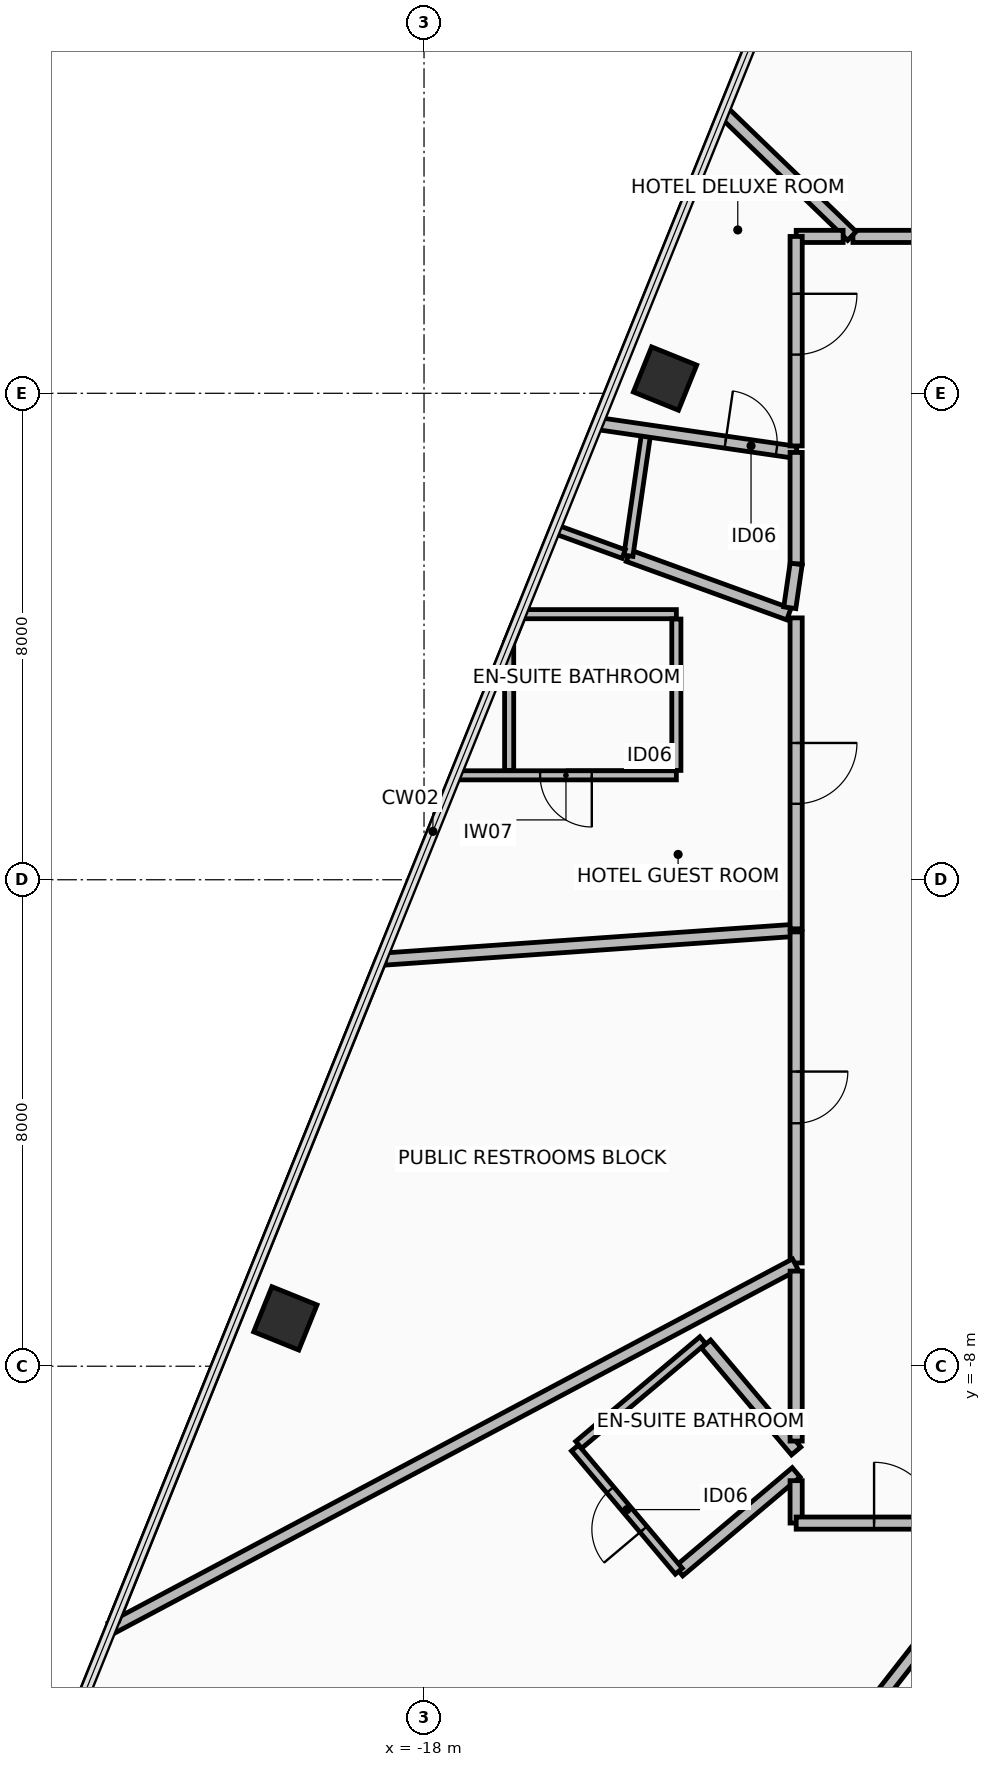
"""IFC4 building model, lengths in metres.
Left out: names, types, materials, properties, quantities, classifications, styles, units other than length and angle.
Written with IfcOpenShell. Run it as: python <this file> out.ifc"""

import sys

from ifc_helpers import new_model, si_unit, direction, frame, frame_2d, origin, origin_2d, place, context, subcontext, project, spatial, rectangle, hollow_rectangle, extrude, element, fill, save


model = new_model("IFC4")
c1 = context("Model", 3, precision=1e-05, world=origin(), true_north=direction((0.0, 1.0)))
c2 = subcontext(c1, "Body", "Model", "MODEL_VIEW")
j1 = project(units=[si_unit("LENGTHUNIT", "METRE"), si_unit("PLANEANGLEUNIT", "RADIAN")], contexts=[c1])
p1 = place(None, origin())
s1 = spatial("IfcSite", under=j1, at=p1, CompositionType="ELEMENT")
p2 = place(p1, origin())
s2 = spatial("IfcBuilding", under=s1, at=p2, CompositionType="ELEMENT")
p3 = place(p2, frame((0.0, 0.0, 67.3)))
s3 = spatial("IfcBuildingStorey", under=s2, at=p3, CompositionType="ELEMENT", Elevation=67.3)
for number, where, z_axis, x_axis in (
    (1, (-14.036, 8.242, 0.0), (0.0, 0.0, 1.0), (0.375, 0.927, 0.0)),
    (2, (-20.281, -7.213, 0.0), (0.0, 0.0, 1.0), (0.375, 0.927, 0.0)),
):
    element("IfcColumn", number, at=place(p3, frame(where, z_axis=z_axis, x_axis=x_axis)), inside=s3, PredefinedType="COLUMN", context=c2, shape_type="SweptSolid", body=[
        extrude(hollow_rectangle(XDim=0.8, YDim=0.8, WallThickness=0.045, at=origin_2d()), origin(), (0.0, 0.0, 1.0), 3.45),
    ])
p4 = place(p3, frame((-12.0, 4.368, 0.0), z_axis=(0.0, 0.0, 1.0), x_axis=(-0.939689330019, 0.342029184499, 0.0)))
e3 = element("IfcWall", 3, at=p4, inside=s3, PredefinedType="PARTITIONING", context=c2, shape_type="SweptSolid", body=[
    extrude(rectangle(XDim=2.809, YDim=0.2, at=frame_2d((1.404, 0.0))), origin(), (0.0, 0.0, 1.0), 2.87),
])
p5 = place(p3, frame((-14.639, 5.328, 0.0), z_axis=(0.0, 0.0, 1.0), x_axis=(0.143755820494, 0.989613189117, 0.0)))
e4 = element("IfcWall", 4, at=p5, inside=s3, PredefinedType="PARTITIONING", context=c2, shape_type="SweptSolid", body=[
    extrude(rectangle(XDim=2.079, YDim=0.15, at=frame_2d((1.039, 0.0))), origin(), (0.0, 0.0, 1.0), 2.47),
])
p6 = place(p3, frame((-15.144, 7.502, 0.0), z_axis=(0.0, 0.0, 1.0), x_axis=(0.989616702709, -0.143731630892, 0.0)))
e5 = element("IfcWall", 5, at=p6, inside=s3, PredefinedType="PARTITIONING", context=c2, shape_type="SweptSolid", body=[
    extrude(rectangle(XDim=3.299, YDim=0.2, at=frame_2d((1.649, 0.0))), origin(), (0.0, 0.0, 1.0), 2.47),
])
p7 = place(p6, frame((2.124, 0.0, 0.0)))
e6 = element("IfcOpeningElement", 6, at=p7, cuts=e5, PredefinedType="OPENING", context=c2, shape_type="SweptSolid", body=[
    extrude(rectangle(XDim=0.85, YDim=2.1, at=frame_2d((0.425, 1.05))), frame((0.0, 0.11, 0.0), z_axis=(0.0, -1.0, 0.0), x_axis=(1.0, 0.0, 0.0)), (0.0, 0.0, 1.0), 0.22),
])
p8 = place(p3, frame((-11.88, 7.028, 0.0), z_axis=(0.0, 0.0, 1.0), x_axis=(0.0, -1.0, 0.0)))
e7 = element("IfcWall", 7, at=p8, inside=s3, PredefinedType="PARTITIONING", context=c2, shape_type="SweptSolid", body=[
    extrude(rectangle(XDim=1.834, YDim=0.2, at=frame_2d((0.917, 0.0))), origin(), (0.0, 0.0, 1.0), 2.87),
])
p9 = place(p3, frame((-11.88, 5.194, 0.0), z_axis=(0.0, 0.0, 1.0), x_axis=(-0.143909981619, -0.989590782693, 0.0)))
e8 = element("IfcWall", 8, at=p9, inside=s3, PredefinedType="PARTITIONING", context=c2, shape_type="SweptSolid", body=[
    extrude(rectangle(XDim=0.728, YDim=0.2, at=frame_2d((0.364, 0.0))), origin(), (0.0, 0.0, 1.0), 3.275),
])
p10 = place(p3, frame((-13.85, 1.718, 0.0), z_axis=(0.0, 0.0, 1.0), x_axis=(-1.0, 0.0, 0.0)))
e9 = element("IfcWall", 9, at=p10, inside=s3, PredefinedType="PARTITIONING", context=c2, shape_type="SweptSolid", body=[
    extrude(rectangle(XDim=3.631, YDim=0.15, at=frame_2d((1.816, 0.0))), origin(), (0.0, 0.0, 1.0), 2.47),
])
p11 = place(p10, frame((1.391, 0.0, 0.0)))
e10 = element("IfcOpeningElement", 10, at=p11, cuts=e9, PredefinedType="OPENING", context=c2, shape_type="SweptSolid", body=[
    extrude(rectangle(XDim=0.85, YDim=2.1, at=frame_2d((0.425, 1.05))), frame((0.0, 0.085, 0.0), z_axis=(0.0, -1.0, 0.0), x_axis=(1.0, 0.0, 0.0)), (0.0, 0.0, 1.0), 0.17),
])
p12 = place(p3, frame((-16.6, 1.798, 0.0), z_axis=(0.0, 0.0, 1.0), x_axis=(0.0, 1.0, 0.0)))
e11 = element("IfcWall", 11, at=p12, inside=s3, PredefinedType="PARTITIONING", context=c2, shape_type="SweptSolid", body=[
    extrude(rectangle(XDim=2.102, YDim=0.15, at=frame_2d((1.051, 0.0))), origin(), (0.0, 0.0, 1.0), 2.47),
])
p13 = place(p3, frame((-16.6, 3.899, 0.0), z_axis=(0.0, 0.0, 1.0), x_axis=(0.374886357565, 0.92707077341, 0.0)))
e12 = element("IfcWall", 12, at=p13, inside=s3, PredefinedType="PARTITIONING", context=c2, shape_type="SweptSolid", body=[
    extrude(rectangle(XDim=0.505, YDim=0.15, at=frame_2d((0.253, 0.0))), origin(), (0.0, 0.0, 1.0), 3.275),
])
p14 = place(p3, frame((-16.411, 4.368, 0.0), z_axis=(0.0, 0.0, 1.0), x_axis=(1.0, 0.0, 0.0)))
e13 = element("IfcWall", 13, at=p14, inside=s3, PredefinedType="PARTITIONING", context=c2, shape_type="SweptSolid", body=[
    extrude(rectangle(XDim=2.561, YDim=0.15, at=frame_2d((1.28, 0.0))), origin(), (0.0, 0.0, 1.0), 2.47),
])
p15 = place(p3, frame((-13.85, 4.288, 0.0), z_axis=(0.0, 0.0, 1.0), x_axis=(0.0, -1.0, 0.0)))
e14 = element("IfcWall", 14, at=p15, inside=s3, PredefinedType="PARTITIONING", context=c2, shape_type="SweptSolid", body=[
    extrude(rectangle(XDim=2.49, YDim=0.15, at=frame_2d((1.245, 0.0))), origin(), (0.0, 0.0, 1.0), 3.275),
])
p16 = place(p3, frame((-11.88, -9.745, 0.0), z_axis=(0.0, 0.0, 1.0), x_axis=(-0.764712982519, -0.644371053328, 0.0)))
e15 = element("IfcWall", 15, at=p16, inside=s3, PredefinedType="PARTITIONING", context=c2, shape_type="SweptSolid", body=[
    extrude(rectangle(XDim=2.524, YDim=0.2, at=frame_2d((1.262, 0.0))), origin(), (0.0, 0.0, 1.0), 3.275),
])
p17 = place(p3, frame((-13.81, -11.371, 0.0), z_axis=(0.0, 0.0, 1.0), x_axis=(-0.644478981733, 0.764622025647, 0.0)))
e16 = element("IfcWall", 16, at=p17, inside=s3, PredefinedType="PARTITIONING", context=c2, shape_type="SweptSolid", body=[
    extrude(rectangle(XDim=2.65, YDim=0.15, at=frame_2d((1.325, 0.0))), origin(), (0.0, 0.0, 1.0), 2.87),
])
p18 = place(p17, frame((0.9, 0.0, 0.0)))
e17 = element("IfcOpeningElement", 17, at=p18, cuts=e16, PredefinedType="OPENING", context=c2, shape_type="SweptSolid", body=[
    extrude(rectangle(XDim=0.85, YDim=2.1, at=frame_2d((0.425, 1.05))), frame((0.0, 0.085, 0.0), z_axis=(0.0, -1.0, 0.0), x_axis=(1.0, 0.0, 0.0)), (0.0, 0.0, 1.0), 0.17),
])
p19 = place(p3, frame((-15.456, -9.293, 0.0), z_axis=(0.0, 0.0, 1.0), x_axis=(0.764709608169, 0.644375057846, 0.0)))
e18 = element("IfcWall", 18, at=p19, inside=s3, PredefinedType="PARTITIONING", context=c2, shape_type="SweptSolid", body=[
    extrude(rectangle(XDim=2.67, YDim=0.15, at=frame_2d((1.335, 0.0))), origin(), (0.0, 0.0, 1.0), 2.67),
])
p20 = place(p3, frame((-13.363, -7.634, 0.0), z_axis=(0.0, 0.0, 1.0), x_axis=(0.644400290836, -0.764688345125, 0.0)))
e19 = element("IfcWall", 19, at=p20, inside=s3, PredefinedType="PARTITIONING", context=c2, shape_type="SweptSolid", body=[
    extrude(rectangle(XDim=2.302, YDim=0.2, at=frame_2d((1.151, 0.0))), origin(), (0.0, 0.0, 1.0), 2.67),
])
p21 = place(p3, frame((-18.688, -1.307, 0.0), z_axis=(0.0, 0.0, 1.0), x_axis=(0.997562443225, 0.069779451603, 0.0)))
e20 = element("IfcWall", 20, at=p21, inside=s3, PredefinedType="PARTITIONING", context=c2, shape_type="SweptSolid", body=[
    extrude(rectangle(XDim=6.798, YDim=0.2, at=frame_2d((3.399, 0.0))), origin(), (0.0, 0.0, 1.0), 2.47),
])
p22 = place(p3, frame((-11.88, -0.857, 0.0), z_axis=(0.0, 0.0, 1.0), x_axis=(0.0, -1.0, 0.0)))
e21 = element("IfcWall", 21, at=p22, inside=s3, PredefinedType="PARTITIONING", context=c2, shape_type="SweptSolid", body=[
    extrude(rectangle(XDim=5.444, YDim=0.2, at=frame_2d((2.722, 0.0))), origin(), (0.0, 0.0, 1.0), 3.275),
])
p23 = place(p22, frame((2.297, 0.0, 0.0)))
e22 = element("IfcOpeningElement", 22, at=p23, cuts=e21, PredefinedType="OPENING", context=c2, shape_type="SweptSolid", body=[
    extrude(rectangle(XDim=0.85, YDim=2.1, at=frame_2d((0.425, 1.05))), frame((0.0, 0.11, 0.0), z_axis=(0.0, -1.0, 0.0), x_axis=(1.0, 0.0, 0.0)), (0.0, 0.0, 1.0), 0.22),
])
p24 = place(p3, frame((-11.893, -6.324, 0.0), z_axis=(0.0, 0.0, 1.0), x_axis=(-0.882946043117, -0.469474477416, 0.0)))
e23 = element("IfcWall", 23, at=p24, inside=s3, PredefinedType="PARTITIONING", context=c2, shape_type="SweptSolid", body=[
    extrude(rectangle(XDim=12.747, YDim=0.2, at=frame_2d((6.374, 0.0))), origin(), (0.0, 0.0, 1.0), 2.47),
])
p25 = place(p3, frame((-23.087, -12.156, 0.0), z_axis=(0.0, 0.0, 1.0), x_axis=(0.374605375648, 0.927184346576, 0.0)))
e24 = element("IfcWall", 24, at=p25, inside=s3, PredefinedType="PARTITIONING", context=c2, shape_type="SweptSolid", body=[
    extrude(rectangle(XDim=11.685, YDim=0.15, at=frame_2d((5.842, 0.0))), origin(), (0.0, 0.0, 1.0), 3.275),
])
p26 = place(p3, frame((-4.312, 10.58, 0.0), z_axis=(0.0, 0.0, 1.0), x_axis=(-1.0, 0.0, 0.0)))
e25 = element("IfcWall", 25, at=p26, inside=s3, PredefinedType="PARTITIONING", context=c2, shape_type="SweptSolid", body=[
    extrude(rectangle(XDim=6.634, YDim=0.2, at=frame_2d((3.317, 0.0))), origin(), (0.0, 0.0, 1.0), 2.62),
])
p27 = place(p26, frame((2.817, 0.0, 0.0)))
e26 = element("IfcOpeningElement", 26, at=p27, cuts=e25, PredefinedType="OPENING", context=c2, shape_type="SweptSolid", body=[
    extrude(rectangle(XDim=1.0, YDim=2.15, at=frame_2d((0.5, 1.075))), frame((0.0, 0.11, 0.0), z_axis=(0.0, -1.0, 0.0), x_axis=(1.0, 0.0, 0.0)), (0.0, 0.0, 1.0), 0.22),
])
p28 = place(p3, frame((-10.963, 10.587, 0.0), z_axis=(0.0, 0.0, 1.0), x_axis=(-0.719299093908, 0.69470052073, 0.0)))
e27 = element("IfcWall", 27, at=p28, inside=s3, PredefinedType="PARTITIONING", context=c2, shape_type="SweptSolid", body=[
    extrude(rectangle(XDim=2.918, YDim=0.2, at=frame_2d((1.459, 0.0))), origin(), (0.0, 0.0, 1.0), 2.47),
])
p29 = place(p3, frame((-11.107, 10.58, 0.0), z_axis=(0.0, 0.0, 1.0), x_axis=(-1.0, 0.0, 0.0)))
e28 = element("IfcWall", 28, at=p29, inside=s3, PredefinedType="PARTITIONING", context=c2, shape_type="SweptSolid", body=[
    extrude(rectangle(XDim=0.772, YDim=0.2, at=frame_2d((0.386, 0.0))), origin(), (0.0, 0.0, 1.0), 3.275),
])
p30 = place(p3, frame((-11.88, 10.579, 0.0), z_axis=(0.0, 0.0, 1.0), x_axis=(0.0, -1.0, 0.0)))
e29 = element("IfcWall", 29, at=p30, inside=s3, PredefinedType="PARTITIONING", context=c2, shape_type="SweptSolid", body=[
    extrude(rectangle(XDim=3.445, YDim=0.2, at=frame_2d((1.723, 0.0))), origin(), (0.0, 0.0, 1.0), 2.67),
])
p31 = place(p30, frame((0.943, 0.0, 0.0)))
e30 = element("IfcOpeningElement", 30, at=p31, cuts=e29, PredefinedType="OPENING", context=c2, shape_type="SweptSolid", body=[
    extrude(rectangle(XDim=1.0, YDim=2.15, at=frame_2d((0.5, 1.075))), frame((0.0, 0.11, 0.0), z_axis=(0.0, -1.0, 0.0), x_axis=(1.0, 0.0, 0.0)), (0.0, 0.0, 1.0), 0.22),
])
p32 = place(p3, frame((-14.716, 5.356, 0.0), z_axis=(0.0, 0.0, 1.0), x_axis=(-0.939690305464, 0.342026504552, 0.0)))
e31 = element("IfcWall", 31, at=p32, inside=s3, PredefinedType="PARTITIONING", context=c2, shape_type="SweptSolid", body=[
    extrude(rectangle(XDim=1.176, YDim=0.15, at=frame_2d((0.588, 0.0))), origin(), (0.0, 0.0, 1.0), 2.47),
])
p33 = place(p3, frame((-11.88, 4.306, 0.0), z_axis=(0.0, 0.0, 1.0), x_axis=(0.0, -1.0, 0.0)))
e32 = element("IfcWall", 32, at=p33, inside=s3, PredefinedType="PARTITIONING", context=c2, shape_type="SweptSolid", body=[
    extrude(rectangle(XDim=5.114, YDim=0.2, at=frame_2d((2.557, 0.0))), origin(), (0.0, 0.0, 1.0), 3.275),
])
p34 = place(p33, frame((2.057, 0.0, 0.0)))
e33 = element("IfcOpeningElement", 33, at=p34, cuts=e32, PredefinedType="OPENING", context=c2, shape_type="SweptSolid", body=[
    extrude(rectangle(XDim=1.0, YDim=2.15, at=frame_2d((0.5, 1.075))), frame((0.0, 0.11, 0.0), z_axis=(0.0, -1.0, 0.0), x_axis=(1.0, 0.0, 0.0)), (0.0, 0.0, 1.0), 0.22),
])
p35 = place(p3, frame((-11.88, -6.436, 0.0), z_axis=(0.0, 0.0, 1.0), x_axis=(0.0, -1.0, 0.0)))
e34 = element("IfcWall", 34, at=p35, inside=s3, PredefinedType="PARTITIONING", context=c2, shape_type="SweptSolid", body=[
    extrude(rectangle(XDim=2.795, YDim=0.2, at=frame_2d((1.397, 0.0))), origin(), (0.0, 0.0, 1.0), 2.67),
])
p36 = place(p3, frame((-11.88, -9.882, 0.0), z_axis=(0.0, 0.0, 1.0), x_axis=(0.0, -1.0, 0.0)))
e35 = element("IfcWall", 35, at=p36, inside=s3, PredefinedType="PARTITIONING", context=c2, shape_type="SweptSolid", body=[
    extrude(rectangle(XDim=0.697, YDim=0.2, at=frame_2d((0.349, 0.0))), origin(), (0.0, 0.0, 1.0), 2.67),
])
p37 = place(p3, frame((-11.879, -10.58, 0.0), z_axis=(0.0, 0.0, 1.0), x_axis=(1.0, 0.0, 0.0)))
e36 = element("IfcWall", 36, at=p37, inside=s3, PredefinedType="PARTITIONING", context=c2, shape_type="SweptSolid", body=[
    extrude(rectangle(XDim=3.562, YDim=0.2, at=frame_2d((1.781, 0.0))), origin(), (0.0, 0.0, 1.0), 2.67),
])
p38 = place(p37, frame((1.281, 0.0, 0.0)))
e37 = element("IfcOpeningElement", 37, at=p38, cuts=e36, PredefinedType="OPENING", context=c2, shape_type="SweptSolid", body=[
    extrude(rectangle(XDim=1.0, YDim=2.15, at=frame_2d((0.5, 1.075))), frame((0.0, 0.11, 0.0), z_axis=(0.0, -1.0, 0.0), x_axis=(1.0, 0.0, 0.0)), (0.0, 0.0, 1.0), 0.22),
])
p39 = place(p3, frame((-8.348, -10.685, 0.0), z_axis=(0.0, 0.0, 1.0), x_axis=(-0.615661230884, -0.788010944585, 0.0)))
e38 = element("IfcWall", 38, at=p39, inside=s3, PredefinedType="PARTITIONING", context=c2, shape_type="SweptSolid", body=[
    extrude(rectangle(XDim=20.121, YDim=0.2, at=frame_2d((10.06, 0.0))), origin(), (0.0, 0.0, 1.0), 2.47),
])
p40 = place(p7, origin())
e39 = element("IfcDoor", 39, at=p40, inside=s3, OperationType="SINGLE_SWING_RIGHT", PredefinedType="DOOR", context=c2, shape_type="SweptSolid", body=[
    extrude(rectangle(XDim=0.85, YDim=2.1, at=frame_2d((0.425, 1.05))), frame((0.0, 0.025, 0.0), z_axis=(0.0, -1.0, 0.0), x_axis=(1.0, 0.0, 0.0)), (0.0, 0.0, 1.0), 0.05),
])
fill(e6, e39)
p41 = place(p11, origin())
e40 = element("IfcDoor", 40, at=p41, inside=s3, OperationType="SINGLE_SWING_RIGHT", PredefinedType="DOOR", context=c2, shape_type="SweptSolid", body=[
    extrude(rectangle(XDim=0.85, YDim=2.1, at=frame_2d((0.425, 1.05))), frame((0.0, 0.025, 0.0), z_axis=(0.0, -1.0, 0.0), x_axis=(1.0, 0.0, 0.0)), (0.0, 0.0, 1.0), 0.05),
])
fill(e10, e40)
p42 = place(p18, origin())
e41 = element("IfcDoor", 41, at=p42, inside=s3, OperationType="SINGLE_SWING_RIGHT", PredefinedType="DOOR", context=c2, shape_type="SweptSolid", body=[
    extrude(rectangle(XDim=0.85, YDim=2.1, at=frame_2d((0.425, 1.05))), frame((0.0, 0.025, 0.0), z_axis=(0.0, -1.0, 0.0), x_axis=(1.0, 0.0, 0.0)), (0.0, 0.0, 1.0), 0.05),
])
fill(e17, e41)
p43 = place(p23, origin())
e42 = element("IfcDoor", 42, at=p43, inside=s3, OperationType="SINGLE_SWING_RIGHT", PredefinedType="DOOR", context=c2, shape_type="SweptSolid", body=[
    extrude(rectangle(XDim=0.85, YDim=2.1, at=frame_2d((0.425, 1.05))), frame((0.0, 0.025, 0.0), z_axis=(0.0, -1.0, 0.0), x_axis=(1.0, 0.0, 0.0)), (0.0, 0.0, 1.0), 0.05),
])
fill(e22, e42)
p44 = place(p31, origin())
e43 = element("IfcDoor", 43, at=p44, inside=s3, OperationType="SINGLE_SWING_LEFT", PredefinedType="DOOR", context=c2, shape_type="SweptSolid", body=[
    extrude(rectangle(XDim=1.0, YDim=2.15, at=frame_2d((0.5, 1.075))), frame((0.0, 0.025, 0.0), z_axis=(0.0, -1.0, 0.0), x_axis=(1.0, 0.0, 0.0)), (0.0, 0.0, 1.0), 0.05),
])
fill(e30, e43)
p45 = place(p34, origin())
e44 = element("IfcDoor", 44, at=p45, inside=s3, OperationType="SINGLE_SWING_LEFT", PredefinedType="DOOR", context=c2, shape_type="SweptSolid", body=[
    extrude(rectangle(XDim=1.0, YDim=2.15, at=frame_2d((0.5, 1.075))), frame((0.0, 0.025, 0.0), z_axis=(0.0, -1.0, 0.0), x_axis=(1.0, 0.0, 0.0)), (0.0, 0.0, 1.0), 0.05),
])
fill(e33, e44)
p46 = place(p38, origin())
e45 = element("IfcDoor", 45, at=p46, inside=s3, OperationType="SINGLE_SWING_LEFT", PredefinedType="DOOR", context=c2, shape_type="SweptSolid", body=[
    extrude(rectangle(XDim=1.0, YDim=2.15, at=frame_2d((0.5, 1.075))), frame((0.0, 0.025, 0.0), z_axis=(0.0, -1.0, 0.0), x_axis=(1.0, 0.0, 0.0)), (0.0, 0.0, 1.0), 0.05),
])
fill(e37, e45)
save(model, sys.argv[1])
